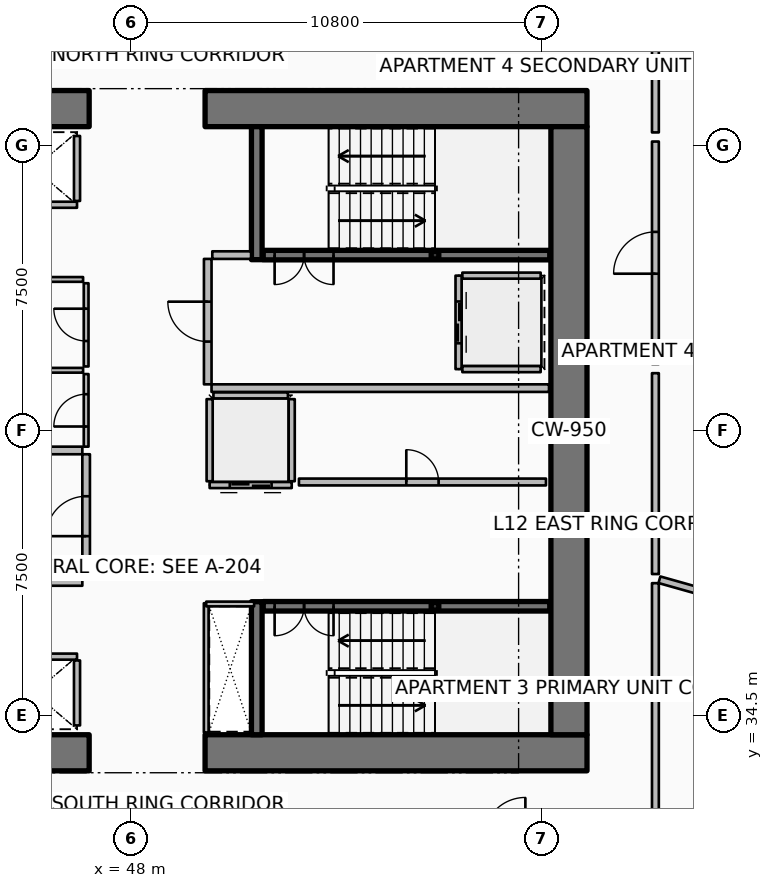
"""IFC4 building model, lengths in metres.
Left out: names, types, materials, properties, quantities, classifications, styles, units other than length and angle.
Written with IfcOpenShell. Run it as: python <this file> out.ifc"""

import sys

from ifc_helpers import new_model, si_unit, direction, frame, frame_2d, origin, origin_2d, place, context, subcontext, project, spatial, rectangle, hollow_rectangle, extrude, element, fill, save


model = new_model("IFC4")
c1 = context("Model", 3, precision=1e-05, world=origin(), true_north=direction((0.0, 1.0)))
c2 = subcontext(c1, "Body", "Model", "MODEL_VIEW")
j1 = project(units=[si_unit("LENGTHUNIT", "METRE"), si_unit("PLANEANGLEUNIT", "RADIAN")], contexts=[c1])
p1 = place(None, origin())
s1 = spatial("IfcSite", under=j1, at=p1, CompositionType="ELEMENT")
p2 = place(p1, origin())
s2 = spatial("IfcBuilding", under=s1, at=p2, CompositionType="ELEMENT")
p3 = place(p2, frame((0.0, 0.0, 52.65)))
s3 = spatial("IfcBuildingStorey", under=s2, at=p3, CompositionType="ELEMENT", Elevation=52.65)
p4 = place(p3, frame((36.85, 33.525, 0.0), z_axis=(0.0, 0.0, 1.0), x_axis=(1.0, 0.0, 0.0)))
e1 = element("IfcWall", 1, at=p4, inside=s3, PredefinedType="SHEAR", context=c2, shape_type="SweptSolid", body=[
    extrude(rectangle(XDim=10.05, YDim=0.95, at=frame_2d((5.025, 0.0))), origin(), (0.0, 0.0, 1.0), 3.75),
])
p5 = place(p3, frame((49.95, 33.525, 0.0), z_axis=(0.0, 0.0, 1.0), x_axis=(1.0, 0.0, 0.0)))
e2 = element("IfcWall", 2, at=p5, inside=s3, PredefinedType="SHEAR", context=c2, shape_type="SweptSolid", body=[
    extrude(rectangle(XDim=10.05, YDim=0.95, at=frame_2d((5.025, 0.0))), origin(), (0.0, 0.0, 1.0), 3.75),
])
p6 = place(p3, frame((36.85, 50.475, 0.0), z_axis=(0.0, 0.0, 1.0), x_axis=(1.0, 0.0, 0.0)))
e3 = element("IfcWall", 3, at=p6, inside=s3, PredefinedType="SHEAR", context=c2, shape_type="SweptSolid", body=[
    extrude(rectangle(XDim=10.05, YDim=0.95, at=frame_2d((5.025, 0.0))), origin(), (0.0, 0.0, 1.0), 3.75),
])
p7 = place(p3, frame((49.95, 50.475, 0.0), z_axis=(0.0, 0.0, 1.0), x_axis=(1.0, 0.0, 0.0)))
e4 = element("IfcWall", 4, at=p7, inside=s3, PredefinedType="SHEAR", context=c2, shape_type="SweptSolid", body=[
    extrude(rectangle(XDim=10.05, YDim=0.95, at=frame_2d((5.025, 0.0))), origin(), (0.0, 0.0, 1.0), 3.75),
])
p8 = place(p3, frame((59.525, 34.0, 0.0), z_axis=(0.0, 0.0, 1.0), x_axis=(0.0, 1.0, 0.0)))
e5 = element("IfcWall", 5, at=p8, inside=s3, PredefinedType="SHEAR", context=c2, shape_type="SweptSolid", body=[
    extrude(rectangle(XDim=16.0, YDim=0.95, at=frame_2d((8.0, 0.0))), origin(), (0.0, 0.0, 1.0), 3.75),
])
for number, where, z_axis, x_axis in (
    (6, (51.31, 46.5, 0.0), (0.0, 0.0, 1.0), (0.0, 1.0, 0.0)),
    (7, (51.31, 34.0, 0.0), (0.0, 0.0, 1.0), (0.0, 1.0, 0.0)),
):
    element("IfcWall", number, at=place(p3, frame(where, z_axis=z_axis, x_axis=x_axis)), inside=s3, PredefinedType="SHEAR", context=c2, shape_type="SweptSolid", body=[
        extrude(rectangle(XDim=3.5, YDim=0.28, at=frame_2d((1.75, 0.0))), origin(), (0.0, 0.0, 1.0), 3.75),
    ])
for number, where, z_axis, x_axis in (
    (8, (56.0, 46.62, 0.0), (0.0, 0.0, 1.0), (1.0, 0.0, 0.0)),
    (9, (56.0, 37.38, 0.0), (0.0, 0.0, 1.0), (1.0, 0.0, 0.0)),
):
    element("IfcColumn", number, at=place(p3, frame(where, z_axis=z_axis, x_axis=x_axis)), inside=s3, PredefinedType="COLUMN", context=c2, shape_type="SweptSolid", body=[
        extrude(hollow_rectangle(XDim=0.2, YDim=0.2, WallThickness=0.01, InnerFilletRadius=0.01, OuterFilletRadius=0.02, at=origin_2d()), origin(), (0.0, 0.0, 1.0), 1.67),
    ])
p9 = place(p3, frame((51.48, 46.62, 0.0), z_axis=(0.0, 0.0, 1.0), x_axis=(1.0, 0.0, 0.0)))
e10 = element("IfcWall", 10, at=p9, inside=s3, PredefinedType="SOLIDWALL", context=c2, shape_type="SweptSolid", body=[
    extrude(rectangle(XDim=7.54, YDim=0.25, at=frame_2d((3.77, 0.0))), origin(), (0.0, 0.0, 1.0), 3.5),
])
p10 = place(p9, frame((0.3, 0.0, 0.0)))
e11 = element("IfcOpeningElement", 11, at=p10, cuts=e10, PredefinedType="OPENING", context=c2, shape_type="SweptSolid", body=[
    extrude(rectangle(XDim=1.55, YDim=2.15, at=frame_2d((0.775, 1.075))), frame((0.0, 0.135, 0.0), z_axis=(0.0, -1.0, 0.0), x_axis=(1.0, 0.0, 0.0)), (0.0, 0.0, 1.0), 0.27),
])
p11 = place(p3, frame((51.48, 37.38, 0.0), z_axis=(0.0, 0.0, 1.0), x_axis=(1.0, 0.0, 0.0)))
e12 = element("IfcWall", 12, at=p11, inside=s3, PredefinedType="SOLIDWALL", context=c2, shape_type="SweptSolid", body=[
    extrude(rectangle(XDim=7.54, YDim=0.25, at=frame_2d((3.77, 0.0))), origin(), (0.0, 0.0, 1.0), 3.5),
])
p12 = place(p11, frame((0.3, 0.0, 0.0)))
e13 = element("IfcOpeningElement", 13, at=p12, cuts=e12, PredefinedType="OPENING", context=c2, shape_type="SweptSolid", body=[
    extrude(rectangle(XDim=1.55, YDim=2.15, at=frame_2d((0.775, 1.075))), frame((0.0, 0.135, 0.0), z_axis=(0.0, -1.0, 0.0), x_axis=(1.0, 0.0, 0.0)), (0.0, 0.0, 1.0), 0.27),
])
p13 = place(p3, frame((46.58, 47.945, 0.0), z_axis=(0.0, 0.0, 1.0), x_axis=(-1.0, 0.0, 0.0)))
e14 = element("IfcWall", 14, at=p13, inside=s3, PredefinedType="PARTITIONING", context=c2, shape_type="SweptSolid", body=[
    extrude(rectangle(XDim=2.26, YDim=0.16, at=frame_2d((1.13, 0.0))), origin(), (0.0, 0.0, 1.0), 3.5),
])
p14 = place(p3, frame((46.58, 48.045, 0.0), z_axis=(0.0, 0.0, 1.0), x_axis=(0.0, 1.0, 0.0)))
e15 = element("IfcWall", 15, at=p14, inside=s3, PredefinedType="PARTITIONING", context=c2, shape_type="SweptSolid", body=[
    extrude(rectangle(XDim=1.71, YDim=0.16, at=frame_2d((0.855, 0.0))), origin(), (0.0, 0.0, 1.0), 3.5),
])
p15 = place(p3, frame((44.32, 36.055, 0.0), z_axis=(0.0, 0.0, 1.0), x_axis=(1.0, 0.0, 0.0)))
e16 = element("IfcWall", 16, at=p15, inside=s3, PredefinedType="PARTITIONING", context=c2, shape_type="SweptSolid", body=[
    extrude(rectangle(XDim=2.26, YDim=0.16, at=frame_2d((1.13, 0.0))), origin(), (0.0, 0.0, 1.0), 3.5),
])
p16 = place(p3, frame((46.58, 34.245, 0.0), z_axis=(0.0, 0.0, 1.0), x_axis=(0.0, 1.0, 0.0)))
e17 = element("IfcWall", 17, at=p16, inside=s3, PredefinedType="PARTITIONING", context=c2, shape_type="SweptSolid", body=[
    extrude(rectangle(XDim=1.71, YDim=0.16, at=frame_2d((0.855, 0.0))), origin(), (0.0, 0.0, 1.0), 3.5),
])
p17 = place(p3, frame((56.62, 46.08, 0.0), z_axis=(0.0, 0.0, 1.0), x_axis=(0.0, -1.0, 0.0)))
e18 = element("IfcWall", 18, at=p17, inside=s3, PredefinedType="PARTITIONING", context=c2, shape_type="SweptSolid", body=[
    extrude(rectangle(XDim=2.46, YDim=0.16, at=frame_2d((1.23, 0.0))), origin(), (0.0, 0.0, 1.0), 3.5),
])
p18 = place(p17, frame((0.68, 0.0, 0.0)))
e19 = element("IfcOpeningElement", 19, at=p18, cuts=e18, PredefinedType="OPENING", context=c2, shape_type="SweptSolid", body=[
    extrude(rectangle(XDim=1.1, YDim=2.1, at=frame_2d((0.55, 1.05))), frame((0.0, 0.09, 0.0), z_axis=(0.0, -1.0, 0.0), x_axis=(1.0, 0.0, 0.0)), (0.0, 0.0, 1.0), 0.18),
])
for number, where, z_axis, x_axis in (
    (20, (56.72, 46.08, 0.0), (0.0, 0.0, 1.0), (1.0, 0.0, 0.0)),
    (21, (56.72, 43.62, 0.0), (0.0, 0.0, 1.0), (1.0, 0.0, 0.0)),
):
    element("IfcWall", number, at=place(p3, frame(where, z_axis=z_axis, x_axis=x_axis)), inside=s3, PredefinedType="PARTITIONING", context=c2, shape_type="SweptSolid", body=[
        extrude(rectangle(XDim=2.06, YDim=0.16, at=frame_2d((1.03, 0.0))), origin(), (0.0, 0.0, 1.0), 3.5),
    ])
p19 = place(p3, frame((52.23, 40.57, 0.0), z_axis=(0.0, 0.0, 1.0), x_axis=(-1.0, 0.0, 0.0)))
e22 = element("IfcWall", 22, at=p19, inside=s3, PredefinedType="PARTITIONING", context=c2, shape_type="SweptSolid", body=[
    extrude(rectangle(XDim=2.16, YDim=0.16, at=frame_2d((1.08, 0.0))), origin(), (0.0, 0.0, 1.0), 3.5),
])
p20 = place(p19, frame((0.53, 0.0, 0.0)))
e23 = element("IfcOpeningElement", 23, at=p20, cuts=e22, PredefinedType="OPENING", context=c2, shape_type="SweptSolid", body=[
    extrude(rectangle(XDim=1.1, YDim=2.1, at=frame_2d((0.55, 1.05))), frame((0.0, 0.09, 0.0), z_axis=(0.0, -1.0, 0.0), x_axis=(1.0, 0.0, 0.0)), (0.0, 0.0, 1.0), 0.18),
])
for number, where, z_axis, x_axis in (
    (24, (52.23, 40.67, 0.0), (0.0, 0.0, 1.0), (0.0, 1.0, 0.0)),
    (25, (50.07, 40.67, 0.0), (0.0, 0.0, 1.0), (0.0, 1.0, 0.0)),
):
    element("IfcWall", number, at=place(p3, frame(where, z_axis=z_axis, x_axis=x_axis)), inside=s3, PredefinedType="PARTITIONING", context=c2, shape_type="SweptSolid", body=[
        extrude(rectangle(XDim=2.16, YDim=0.16, at=frame_2d((1.08, 0.0))), origin(), (0.0, 0.0, 1.0), 3.5),
    ])
p21 = place(p3, frame((50.17, 42.93, 0.0), z_axis=(0.0, 0.0, 1.0), x_axis=(1.0, 0.0, 0.0)))
e26 = element("IfcWall", 26, at=p21, inside=s3, PredefinedType="PARTITIONING", context=c2, shape_type="SweptSolid", body=[
    extrude(rectangle(XDim=1.96, YDim=0.16, at=frame_2d((0.98, 0.0))), origin(), (0.0, 0.0, 1.0), 3.5),
])
p22 = place(p3, frame((52.42, 40.65, 0.0), z_axis=(0.0, 0.0, 1.0), x_axis=(1.0, 0.0, 0.0)))
e27 = element("IfcWall", 27, at=p22, inside=s3, PredefinedType="PARTITIONING", context=c2, shape_type="SweptSolid", body=[
    extrude(rectangle(XDim=6.5, YDim=0.18, at=frame_2d((3.25, 0.0))), origin(), (0.0, 0.0, 1.0), 3.5),
])
p23 = place(p22, frame((2.825, 0.0, 0.0)))
e28 = element("IfcOpeningElement", 28, at=p23, cuts=e27, PredefinedType="OPENING", context=c2, shape_type="SweptSolid", body=[
    extrude(rectangle(XDim=0.85, YDim=2.06, at=frame_2d((0.425, 1.03))), frame((0.0, 0.1, 0.0), z_axis=(0.0, -1.0, 0.0), x_axis=(1.0, 0.0, 0.0)), (0.0, 0.0, 1.0), 0.2),
])
p24 = place(p3, frame((41.35, 38.02, 0.0), z_axis=(0.0, 0.0, 1.0), x_axis=(1.0, 0.0, 0.0)))
e29 = element("IfcWall", 29, at=p24, inside=s3, PredefinedType="PARTITIONING", context=c2, shape_type="SweptSolid", body=[
    extrude(rectangle(XDim=5.37, YDim=0.2, at=frame_2d((2.685, 0.0))), origin(), (0.0, 0.0, 1.0), 3.5),
])
p25 = place(p3, frame((43.92, 41.48, 0.0), z_axis=(0.0, 0.0, 1.0), x_axis=(1.0, 0.0, 0.0)))
e30 = element("IfcWall", 30, at=p25, inside=s3, PredefinedType="PARTITIONING", context=c2, shape_type="SweptSolid", body=[
    extrude(rectangle(XDim=2.8, YDim=0.2, at=frame_2d((1.4, 0.0))), origin(), (0.0, 0.0, 1.0), 3.5),
])
p26 = place(p3, frame((46.82, 38.12, 0.0), z_axis=(0.0, 0.0, 1.0), x_axis=(0.0, 1.0, 0.0)))
e31 = element("IfcWall", 31, at=p26, inside=s3, PredefinedType="PARTITIONING", context=c2, shape_type="SweptSolid", body=[
    extrude(rectangle(XDim=3.26, YDim=0.2, at=frame_2d((1.63, 0.0))), origin(), (0.0, 0.0, 1.0), 3.5),
])
p27 = place(p26, frame((1.105, 0.0, 0.0)))
e32 = element("IfcOpeningElement", 32, at=p27, cuts=e31, PredefinedType="OPENING", context=c2, shape_type="SweptSolid", body=[
    extrude(rectangle(XDim=1.05, YDim=2.1, at=frame_2d((0.525, 1.05))), frame((0.0, 0.11, 0.0), z_axis=(0.0, -1.0, 0.0), x_axis=(1.0, 0.0, 0.0)), (0.0, 0.0, 1.0), 0.22),
])
p28 = place(p3, frame((50.12, 43.12, 0.0), z_axis=(0.0, 0.0, 1.0), x_axis=(1.0, 0.0, 0.0)))
e33 = element("IfcWall", 33, at=p28, inside=s3, PredefinedType="PARTITIONING", context=c2, shape_type="SweptSolid", body=[
    extrude(rectangle(XDim=8.88, YDim=0.2, at=frame_2d((4.44, 0.0))), origin(), (0.0, 0.0, 1.0), 3.5),
])
p29 = place(p3, frame((50.14, 46.62, 0.0), z_axis=(0.0, 0.0, 1.0), x_axis=(1.0, 0.0, 0.0)))
e34 = element("IfcWall", 34, at=p29, inside=s3, PredefinedType="PARTITIONING", context=c2, shape_type="SweptSolid", body=[
    extrude(rectangle(XDim=1.02, YDim=0.2, at=frame_2d((0.51, 0.0))), origin(), (0.0, 0.0, 1.0), 3.5),
])
p30 = place(p3, frame((50.02, 43.22, 0.0), z_axis=(0.0, 0.0, 1.0), x_axis=(0.0, 1.0, 0.0)))
e35 = element("IfcWall", 35, at=p30, inside=s3, PredefinedType="PARTITIONING", context=c2, shape_type="SweptSolid", body=[
    extrude(rectangle(XDim=3.3, YDim=0.2, at=frame_2d((1.65, 0.0))), origin(), (0.0, 0.0, 1.0), 3.5),
])
p31 = place(p30, frame((1.125, 0.0, 0.0)))
e36 = element("IfcOpeningElement", 36, at=p31, cuts=e35, PredefinedType="OPENING", context=c2, shape_type="SweptSolid", body=[
    extrude(rectangle(XDim=1.05, YDim=2.1, at=frame_2d((0.525, 1.05))), frame((0.0, 0.11, 0.0), z_axis=(0.0, -1.0, 0.0), x_axis=(1.0, 0.0, 0.0)), (0.0, 0.0, 1.0), 0.22),
])
p32 = place(p3, frame((49.98, 34.06, 0.0), z_axis=(0.0, 0.0, 1.0), x_axis=(0.0, 1.0, 0.0)))
e37 = element("IfcWall", 37, at=p32, inside=s3, PredefinedType="PARTITIONING", context=c2, shape_type="SweptSolid", body=[
    extrude(rectangle(XDim=3.4, YDim=0.125, at=frame_2d((1.7, 0.0))), origin(), (0.0, 0.0, 1.0), 2.94),
])
p33 = place(p3, frame((49.98, 37.44, 0.0), z_axis=(0.0, 0.0, 1.0), x_axis=(1.0, 0.0, 0.0)))
e38 = element("IfcWall", 38, at=p33, inside=s3, PredefinedType="PARTITIONING", context=c2, shape_type="SweptSolid", body=[
    extrude(rectangle(XDim=1.26, YDim=0.125, at=frame_2d((0.63, 0.0))), origin(), (0.0, 0.0, 1.0), 2.94),
])
p34 = place(p3, frame((44.03, 43.59, 0.0), z_axis=(0.0, 0.0, 1.0), x_axis=(1.0, 0.0, 0.0)))
e39 = element("IfcWall", 39, at=p34, inside=s3, PredefinedType="PARTITIONING", context=c2, shape_type="SweptSolid", body=[
    extrude(rectangle(XDim=2.71, YDim=0.125, at=frame_2d((1.355, 0.0))), origin(), (0.0, 0.0, 1.0), 2.94),
])
p35 = place(p3, frame((46.82, 41.58, 0.0), z_axis=(0.0, 0.0, 1.0), x_axis=(0.0, 1.0, 0.0)))
e40 = element("IfcWall", 40, at=p35, inside=s3, PredefinedType="PARTITIONING", context=c2, shape_type="SweptSolid", body=[
    extrude(rectangle(XDim=1.91, YDim=0.125, at=frame_2d((0.955, 0.0))), origin(), (0.0, 0.0, 1.0), 2.94),
])
p36 = place(p35, frame((0.53, 0.0, 0.0)))
e41 = element("IfcOpeningElement", 41, at=p36, cuts=e40, PredefinedType="OPENING", context=c2, shape_type="SweptSolid", body=[
    extrude(rectangle(XDim=0.85, YDim=2.06, at=frame_2d((0.425, 1.03))), frame((0.0, 0.073, 0.0), z_axis=(0.0, -1.0, 0.0), x_axis=(1.0, 0.0, 0.0)), (0.0, 0.0, 1.0), 0.145),
])
p37 = place(p3, frame((46.82, 43.69, 0.0), z_axis=(0.0, 0.0, 1.0), x_axis=(0.0, 1.0, 0.0)))
e42 = element("IfcWall", 42, at=p37, inside=s3, PredefinedType="PARTITIONING", context=c2, shape_type="SweptSolid", body=[
    extrude(rectangle(XDim=2.19, YDim=0.125, at=frame_2d((1.095, 0.0))), origin(), (0.0, 0.0, 1.0), 2.94),
])
p38 = place(p37, frame((0.67, 0.0, 0.0)))
e43 = element("IfcOpeningElement", 43, at=p38, cuts=e42, PredefinedType="OPENING", context=c2, shape_type="SweptSolid", body=[
    extrude(rectangle(XDim=0.85, YDim=2.06, at=frame_2d((0.425, 1.03))), frame((0.0, 0.073, 0.0), z_axis=(0.0, -1.0, 0.0), x_axis=(1.0, 0.0, 0.0)), (0.0, 0.0, 1.0), 0.145),
])
p39 = place(p3, frame((45.48, 45.98, 0.0), z_axis=(0.0, 0.0, 1.0), x_axis=(1.0, 0.0, 0.0)))
e44 = element("IfcWall", 44, at=p39, inside=s3, PredefinedType="PARTITIONING", context=c2, shape_type="SweptSolid", body=[
    extrude(rectangle(XDim=1.26, YDim=0.125, at=frame_2d((0.63, 0.0))), origin(), (0.0, 0.0, 1.0), 2.94),
])
p40 = place(p3, frame((61.906, 38.078, 0.0), z_axis=(0.0, 0.0, 1.0), x_axis=(0.962455862511, -0.271438230022, 0.0)))
e45 = element("IfcWall", 45, at=p40, inside=s3, PredefinedType="PARTITIONING", context=c2, shape_type="SweptSolid", body=[
    extrude(rectangle(XDim=16.126, YDim=0.18, at=frame_2d((8.063, 0.0))), origin(), (0.0, 0.0, 1.0), 2.867),
])
p41 = place(p3, frame((61.8, 31.37, 0.0), z_axis=(0.0, 0.0, 1.0), x_axis=(0.0, 1.0, 0.0)))
e46 = element("IfcWall", 46, at=p41, inside=s3, PredefinedType="PARTITIONING", context=c2, shape_type="SweptSolid", body=[
    extrude(rectangle(XDim=6.618, YDim=0.18, at=frame_2d((3.309, 0.0))), origin(), (0.0, 0.0, 1.0), 2.867),
])
p42 = place(p3, frame((61.8, 43.753, 0.0), z_axis=(0.0, 0.0, 1.0), x_axis=(0.0, 1.0, 0.0)))
e47 = element("IfcWall", 47, at=p42, inside=s3, PredefinedType="PARTITIONING", context=c2, shape_type="SweptSolid", body=[
    extrude(rectangle(XDim=5.855, YDim=0.18, at=frame_2d((2.927, 0.0))), origin(), (0.0, 0.0, 1.0), 2.867),
])
p43 = place(p42, frame((2.378, 0.0, 0.0)))
e48 = element("IfcOpeningElement", 48, at=p43, cuts=e47, PredefinedType="OPENING", context=c2, shape_type="SweptSolid", body=[
    extrude(rectangle(XDim=1.1, YDim=2.1, at=frame_2d((0.55, 1.05))), frame((0.0, 0.1, 0.0), z_axis=(0.0, -1.0, 0.0), x_axis=(1.0, 0.0, 0.0)), (0.0, 0.0, 1.0), 0.2),
])
p44 = place(p3, frame((61.8, 38.228, 0.0), z_axis=(0.0, 0.0, 1.0), x_axis=(0.0, 1.0, 0.0)))
e49 = element("IfcWall", 49, at=p44, inside=s3, PredefinedType="PARTITIONING", context=c2, shape_type="SweptSolid", body=[
    extrude(rectangle(XDim=5.285, YDim=0.18, at=frame_2d((2.643, 0.0))), origin(), (0.0, 0.0, 1.0), 2.867),
])
p45 = place(p3, frame((61.8, 49.848, 0.0), z_axis=(0.0, 0.0, 1.0), x_axis=(0.0, 1.0, 0.0)))
e50 = element("IfcWall", 50, at=p45, inside=s3, PredefinedType="PARTITIONING", context=c2, shape_type="SweptSolid", body=[
    extrude(rectangle(XDim=2.781, YDim=0.18, at=frame_2d((1.391, 0.0))), origin(), (0.0, 0.0, 1.0), 2.867),
])
p46 = place(p10, origin())
e51 = element("IfcDoor", 51, at=p46, inside=s3, OperationType="DOUBLE_DOOR_SINGLE_SWING", PredefinedType="DOOR", context=c2, shape_type="SweptSolid", body=[
    extrude(rectangle(XDim=1.55, YDim=2.15, at=frame_2d((0.775, 1.075))), frame((0.0, 0.025, 0.0), z_axis=(0.0, -1.0, 0.0), x_axis=(1.0, 0.0, 0.0)), (0.0, 0.0, 1.0), 0.05),
])
fill(e11, e51)
p47 = place(p12, origin())
e52 = element("IfcDoor", 52, at=p47, inside=s3, OperationType="DOUBLE_DOOR_SINGLE_SWING", PredefinedType="DOOR", context=c2, shape_type="SweptSolid", body=[
    extrude(rectangle(XDim=1.55, YDim=2.15, at=frame_2d((0.775, 1.075))), frame((0.0, 0.025, 0.0), z_axis=(0.0, -1.0, 0.0), x_axis=(1.0, 0.0, 0.0)), (0.0, 0.0, 1.0), 0.05),
])
fill(e13, e52)
p48 = place(p18, origin())
e53 = element("IfcDoor", 53, at=p48, inside=s3, OperationType="DOUBLE_DOOR_SLIDING", PredefinedType="DOOR", context=c2, shape_type="SweptSolid", body=[
    extrude(rectangle(XDim=1.1, YDim=2.1, at=frame_2d((0.55, 1.05))), frame((0.0, 0.025, 0.0), z_axis=(0.0, -1.0, 0.0), x_axis=(1.0, 0.0, 0.0)), (0.0, 0.0, 1.0), 0.05),
])
fill(e19, e53)
p49 = place(p20, origin())
e54 = element("IfcDoor", 54, at=p49, inside=s3, OperationType="DOUBLE_DOOR_SLIDING", PredefinedType="DOOR", context=c2, shape_type="SweptSolid", body=[
    extrude(rectangle(XDim=1.1, YDim=2.1, at=frame_2d((0.55, 1.05))), frame((0.0, 0.025, 0.0), z_axis=(0.0, -1.0, 0.0), x_axis=(1.0, 0.0, 0.0)), (0.0, 0.0, 1.0), 0.05),
])
fill(e23, e54)
p50 = place(p23, origin())
e55 = element("IfcDoor", 55, at=p50, inside=s3, OperationType="SINGLE_SWING_LEFT", PredefinedType="DOOR", context=c2, shape_type="SweptSolid", body=[
    extrude(rectangle(XDim=0.85, YDim=2.06, at=frame_2d((0.425, 1.03))), frame((0.0, 0.025, 0.0), z_axis=(0.0, -1.0, 0.0), x_axis=(1.0, 0.0, 0.0)), (0.0, 0.0, 1.0), 0.05),
])
fill(e28, e55)
p51 = place(p27, origin())
e56 = element("IfcDoor", 56, at=p51, inside=s3, OperationType="SINGLE_SWING_LEFT", PredefinedType="DOOR", context=c2, shape_type="SweptSolid", body=[
    extrude(rectangle(XDim=1.05, YDim=2.1, at=frame_2d((0.525, 1.05))), frame((0.0, 0.025, 0.0), z_axis=(0.0, -1.0, 0.0), x_axis=(1.0, 0.0, 0.0)), (0.0, 0.0, 1.0), 0.05),
])
fill(e32, e56)
p52 = place(p31, origin())
e57 = element("IfcDoor", 57, at=p52, inside=s3, OperationType="SINGLE_SWING_RIGHT", PredefinedType="DOOR", context=c2, shape_type="SweptSolid", body=[
    extrude(rectangle(XDim=1.05, YDim=2.1, at=frame_2d((0.525, 1.05))), frame((0.0, 0.025, 0.0), z_axis=(0.0, -1.0, 0.0), x_axis=(1.0, 0.0, 0.0)), (0.0, 0.0, 1.0), 0.05),
])
fill(e36, e57)
p53 = place(p36, origin())
e58 = element("IfcDoor", 58, at=p53, inside=s3, OperationType="SINGLE_SWING_LEFT", PredefinedType="DOOR", context=c2, shape_type="SweptSolid", body=[
    extrude(rectangle(XDim=0.85, YDim=2.06, at=frame_2d((0.425, 1.03))), frame((0.0, 0.025, 0.0), z_axis=(0.0, -1.0, 0.0), x_axis=(1.0, 0.0, 0.0)), (0.0, 0.0, 1.0), 0.05),
])
fill(e41, e58)
p54 = place(p38, origin())
e59 = element("IfcDoor", 59, at=p54, inside=s3, OperationType="SINGLE_SWING_RIGHT", PredefinedType="DOOR", context=c2, shape_type="SweptSolid", body=[
    extrude(rectangle(XDim=0.85, YDim=2.06, at=frame_2d((0.425, 1.03))), frame((0.0, 0.025, 0.0), z_axis=(0.0, -1.0, 0.0), x_axis=(1.0, 0.0, 0.0)), (0.0, 0.0, 1.0), 0.05),
])
fill(e43, e59)
p55 = place(p43, origin())
e60 = element("IfcDoor", 60, at=p55, inside=s3, OperationType="SINGLE_SWING_LEFT", PredefinedType="DOOR", context=c2, shape_type="SweptSolid", body=[
    extrude(rectangle(XDim=1.1, YDim=2.1, at=frame_2d((0.55, 1.05))), frame((0.0, 0.025, 0.0), z_axis=(0.0, -1.0, 0.0), x_axis=(1.0, 0.0, 0.0)), (0.0, 0.0, 1.0), 0.05),
])
fill(e48, e60)
save(model, sys.argv[1])
